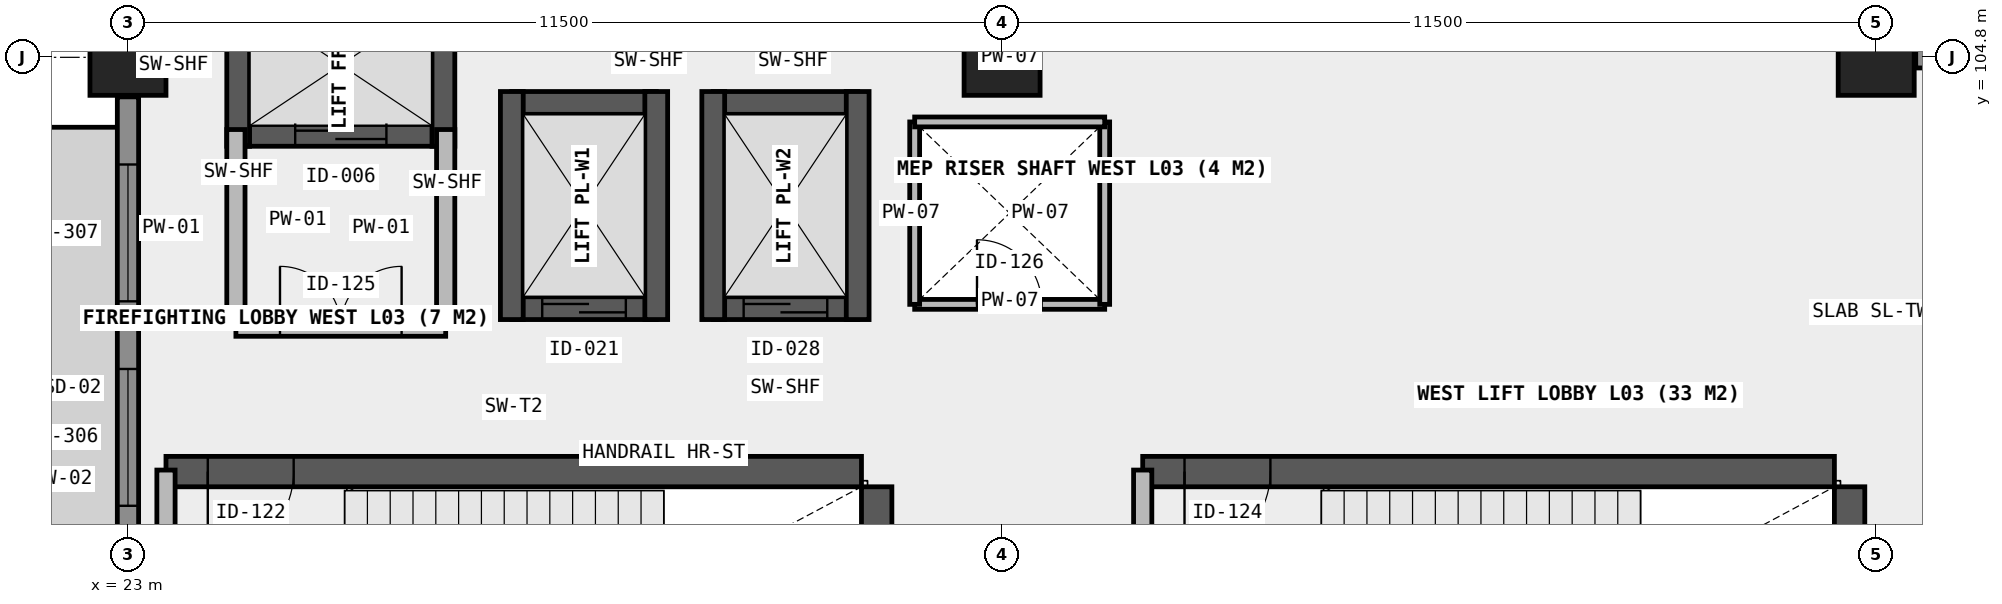
"""IFC4 building model, lengths in metres.
Left out: names, types, materials, properties, quantities, classifications, styles, units other than length and angle.
Written with IfcOpenShell. Run it as: python <this file> out.ifc"""

import sys

from ifc_helpers import new_model, si_unit, direction, frame, frame_2d, origin, origin_2d, place, context, subcontext, project, spatial, rectangle, extrude, element, fill, save


model = new_model("IFC4")
c1 = context("Model", 3, precision=1e-05, world=origin(), true_north=direction((0.0, 1.0)))
c2 = subcontext(c1, "Body", "Model", "MODEL_VIEW")
j1 = project(units=[si_unit("LENGTHUNIT", "METRE"), si_unit("PLANEANGLEUNIT", "RADIAN")], contexts=[c1])
p1 = place(None, origin())
s1 = spatial("IfcSite", under=j1, at=p1, CompositionType="ELEMENT")
p2 = place(p1, origin())
s2 = spatial("IfcBuilding", under=s1, at=p2, CompositionType="ELEMENT")
p3 = place(p2, frame((0.0, 0.0, 13.8)))
s3 = spatial("IfcBuildingStorey", under=s2, at=p3, CompositionType="ELEMENT", Elevation=13.8)
for number, where, z_axis, x_axis in (
    (1, (23.0, 104.8, 0.0), (0.0, 0.0, 1.0), (1.0, 0.0, 0.0)),
    (2, (34.5, 104.8, 0.0), (0.0, 0.0, 1.0), (1.0, 0.0, 0.0)),
    (3, (46.0, 104.8, 0.0), (0.0, 0.0, 1.0), (1.0, 0.0, 0.0)),
):
    element("IfcColumn", number, at=place(p3, frame(where, z_axis=z_axis, x_axis=x_axis)), inside=s3, PredefinedType="COLUMN", context=c2, shape_type="SweptSolid", body=[
        extrude(rectangle(XDim=1.0, YDim=1.0, at=origin_2d()), origin(), (0.0, 0.0, 1.0), 4.5),
    ])
p4 = place(p3, frame((24.45, 103.78, 0.0), z_axis=(0.0, 0.0, 1.0), x_axis=(1.0, 0.0, 0.0)))
e4 = element("IfcWall", 4, at=p4, inside=s3, PredefinedType="SHEAR", context=c2, shape_type="SweptSolid", body=[
    extrude(rectangle(XDim=2.7, YDim=0.3, at=frame_2d((1.35, 0.0))), origin(), (0.0, 0.0, 1.0), 4.5),
])
p5 = place(p4, frame((0.75, 0.0, 0.0)))
e5 = element("IfcOpeningElement", 5, at=p5, cuts=e4, PredefinedType="OPENING", context=c2, shape_type="SweptSolid", body=[
    extrude(rectangle(XDim=1.2, YDim=2.15, at=frame_2d((0.6, 1.075))), frame((0.0, 0.16, 0.0), z_axis=(0.0, -1.0, 0.0), x_axis=(1.0, 0.0, 0.0)), (0.0, 0.0, 1.0), 0.32),
])
for number, where, z_axis, x_axis in (
    (6, (24.45, 103.63, 0.0), (0.0, 0.0, 1.0), (0.0, 1.0, 0.0)),
    (7, (27.15, 103.63, 0.0), (0.0, 0.0, 1.0), (0.0, 1.0, 0.0)),
):
    element("IfcWall", number, at=place(p3, frame(where, z_axis=z_axis, x_axis=x_axis)), inside=s3, PredefinedType="SHEAR", context=c2, shape_type="SweptSolid", body=[
        extrude(rectangle(XDim=2.14, YDim=0.3, at=frame_2d((1.07, 0.0))), origin(), (0.0, 0.0, 1.0), 4.5),
    ])
p6 = place(p3, frame((28.05, 101.5, 0.0), z_axis=(0.0, 0.0, 1.0), x_axis=(1.0, 0.0, 0.0)))
e8 = element("IfcWall", 8, at=p6, inside=s3, PredefinedType="SHEAR", context=c2, shape_type="SweptSolid", body=[
    extrude(rectangle(XDim=1.9, YDim=0.3, at=frame_2d((0.95, 0.0))), origin(), (0.0, 0.0, 1.0), 4.5),
])
p7 = place(p6, frame((0.4, 0.0, 0.0)))
e9 = element("IfcOpeningElement", 9, at=p7, cuts=e8, PredefinedType="OPENING", context=c2, shape_type="SweptSolid", body=[
    extrude(rectangle(XDim=1.1, YDim=2.15, at=frame_2d((0.55, 1.075))), frame((0.0, 0.16, 0.0), z_axis=(0.0, -1.0, 0.0), x_axis=(1.0, 0.0, 0.0)), (0.0, 0.0, 1.0), 0.32),
])
p8 = place(p3, frame((28.05, 104.2, 0.0), z_axis=(0.0, 0.0, 1.0), x_axis=(1.0, 0.0, 0.0)))
e10 = element("IfcWall", 10, at=p8, inside=s3, PredefinedType="SHEAR", context=c2, shape_type="SweptSolid", body=[
    extrude(rectangle(XDim=1.9, YDim=0.3, at=frame_2d((0.95, 0.0))), origin(), (0.0, 0.0, 1.0), 4.5),
])
for number, where, z_axis, x_axis in (
    (11, (28.05, 101.35, 0.0), (0.0, 0.0, 1.0), (0.0, 1.0, 0.0)),
    (12, (29.95, 101.35, 0.0), (0.0, 0.0, 1.0), (0.0, 1.0, 0.0)),
):
    element("IfcWall", number, at=place(p3, frame(where, z_axis=z_axis, x_axis=x_axis)), inside=s3, PredefinedType="SHEAR", context=c2, shape_type="SweptSolid", body=[
        extrude(rectangle(XDim=3.0, YDim=0.3, at=frame_2d((1.5, 0.0))), origin(), (0.0, 0.0, 1.0), 4.5),
    ])
p9 = place(p3, frame((30.7, 101.5, 0.0), z_axis=(0.0, 0.0, 1.0), x_axis=(1.0, 0.0, 0.0)))
e13 = element("IfcWall", 13, at=p9, inside=s3, PredefinedType="SHEAR", context=c2, shape_type="SweptSolid", body=[
    extrude(rectangle(XDim=1.9, YDim=0.3, at=frame_2d((0.95, 0.0))), origin(), (0.0, 0.0, 1.0), 4.5),
])
p10 = place(p9, frame((0.4, 0.0, 0.0)))
e14 = element("IfcOpeningElement", 14, at=p10, cuts=e13, PredefinedType="OPENING", context=c2, shape_type="SweptSolid", body=[
    extrude(rectangle(XDim=1.1, YDim=2.15, at=frame_2d((0.55, 1.075))), frame((0.0, 0.16, 0.0), z_axis=(0.0, -1.0, 0.0), x_axis=(1.0, 0.0, 0.0)), (0.0, 0.0, 1.0), 0.32),
])
p11 = place(p3, frame((30.7, 104.2, 0.0), z_axis=(0.0, 0.0, 1.0), x_axis=(1.0, 0.0, 0.0)))
e15 = element("IfcWall", 15, at=p11, inside=s3, PredefinedType="SHEAR", context=c2, shape_type="SweptSolid", body=[
    extrude(rectangle(XDim=1.9, YDim=0.3, at=frame_2d((0.95, 0.0))), origin(), (0.0, 0.0, 1.0), 4.5),
])
for number, where, z_axis, x_axis in (
    (16, (30.7, 101.35, 0.0), (0.0, 0.0, 1.0), (0.0, 1.0, 0.0)),
    (17, (32.6, 101.35, 0.0), (0.0, 0.0, 1.0), (0.0, 1.0, 0.0)),
):
    element("IfcWall", number, at=place(p3, frame(where, z_axis=z_axis, x_axis=x_axis)), inside=s3, PredefinedType="SHEAR", context=c2, shape_type="SweptSolid", body=[
        extrude(rectangle(XDim=3.0, YDim=0.3, at=frame_2d((1.5, 0.0))), origin(), (0.0, 0.0, 1.0), 4.5),
    ])
p12 = place(p3, frame((23.5, 99.35, 0.0), z_axis=(0.0, 0.0, 1.0), x_axis=(1.0, 0.0, 0.0)))
e18 = element("IfcWall", 18, at=p12, inside=s3, PredefinedType="SHEAR", context=c2, shape_type="SweptSolid", body=[
    extrude(rectangle(XDim=9.15, YDim=0.4, at=frame_2d((4.575, 0.0))), origin(), (0.0, 0.0, 1.0), 4.5),
])
p13 = place(p12, frame((0.55, 0.0, 0.0)))
e19 = element("IfcOpeningElement", 19, at=p13, cuts=e18, PredefinedType="OPENING", context=c2, shape_type="SweptSolid", body=[
    extrude(rectangle(XDim=1.13, YDim=2.15, at=frame_2d((0.565, 1.075))), frame((0.0, 0.21, 0.0), z_axis=(0.0, -1.0, 0.0), x_axis=(1.0, 0.0, 0.0)), (0.0, 0.0, 1.0), 0.42),
])
p14 = place(p3, frame((32.85, 95.55, 0.0), z_axis=(0.0, 0.0, 1.0), x_axis=(0.0, 1.0, 0.0)))
e20 = element("IfcWall", 20, at=p14, inside=s3, PredefinedType="SHEAR", context=c2, shape_type="SweptSolid", body=[
    extrude(rectangle(XDim=3.6, YDim=0.4, at=frame_2d((1.8, 0.0))), origin(), (0.0, 0.0, 1.0), 4.5),
])
p15 = place(p3, frame((36.35, 99.35, 0.0), z_axis=(0.0, 0.0, 1.0), x_axis=(1.0, 0.0, 0.0)))
e21 = element("IfcWall", 21, at=p15, inside=s3, PredefinedType="SHEAR", context=c2, shape_type="SweptSolid", body=[
    extrude(rectangle(XDim=9.1, YDim=0.4, at=frame_2d((4.55, 0.0))), origin(), (0.0, 0.0, 1.0), 4.5),
])
p16 = place(p15, frame((0.55, 0.0, 0.0)))
e22 = element("IfcOpeningElement", 22, at=p16, cuts=e21, PredefinedType="OPENING", context=c2, shape_type="SweptSolid", body=[
    extrude(rectangle(XDim=1.13, YDim=2.15, at=frame_2d((0.565, 1.075))), frame((0.0, 0.21, 0.0), z_axis=(0.0, -1.0, 0.0), x_axis=(1.0, 0.0, 0.0)), (0.0, 0.0, 1.0), 0.42),
])
p17 = place(p3, frame((45.65, 95.32, 0.0), z_axis=(0.0, 0.0, 1.0), x_axis=(0.0, 1.0, 0.0)))
e23 = element("IfcWall", 23, at=p17, inside=s3, PredefinedType="SHEAR", context=c2, shape_type="SweptSolid", body=[
    extrude(rectangle(XDim=3.83, YDim=0.4, at=frame_2d((1.915, 0.0))), origin(), (0.0, 0.0, 1.0), 4.5),
])
p18 = place(p3, frame((46.52, 104.8, 0.0), z_axis=(0.0, 0.0, 1.0), x_axis=(1.0, 0.0, 0.0)))
e24 = element("IfcWall", 24, at=p18, inside=s3, PredefinedType="SOLIDWALL", context=c2, shape_type="SweptSolid", body=[
    extrude(rectangle(XDim=10.46, YDim=0.28, at=frame_2d((5.23, 0.0))), origin(), (0.0, 0.0, 1.0), 3.45),
])
p19 = place(p18, frame((1.265, 0.0, 0.85)))
e25 = element("IfcOpeningElement", 25, at=p19, cuts=e24, PredefinedType="OPENING", context=c2, shape_type="SweptSolid", body=[
    extrude(rectangle(XDim=1.8, YDim=1.95, at=frame_2d((0.9, 0.975))), frame((0.0, 0.15, 0.0), z_axis=(0.0, -1.0, 0.0), x_axis=(1.0, 0.0, 0.0)), (0.0, 0.0, 1.0), 0.3),
])
p20 = place(p18, frame((4.33, 0.0, 0.85)))
e26 = element("IfcOpeningElement", 26, at=p20, cuts=e24, PredefinedType="OPENING", context=c2, shape_type="SweptSolid", body=[
    extrude(rectangle(XDim=1.8, YDim=1.95, at=frame_2d((0.9, 0.975))), frame((0.0, 0.15, 0.0), z_axis=(0.0, -1.0, 0.0), x_axis=(1.0, 0.0, 0.0)), (0.0, 0.0, 1.0), 0.3),
])
p21 = place(p18, frame((7.395, 0.0, 0.85)))
e27 = element("IfcOpeningElement", 27, at=p21, cuts=e24, PredefinedType="OPENING", context=c2, shape_type="SweptSolid", body=[
    extrude(rectangle(XDim=1.8, YDim=1.95, at=frame_2d((0.9, 0.975))), frame((0.0, 0.15, 0.0), z_axis=(0.0, -1.0, 0.0), x_axis=(1.0, 0.0, 0.0)), (0.0, 0.0, 1.0), 0.3),
])
p22 = place(p3, frame((23.0, 95.32, 0.0), z_axis=(0.0, 0.0, 1.0), x_axis=(0.0, 1.0, 0.0)))
e28 = element("IfcWall", 28, at=p22, inside=s3, PredefinedType="SOLIDWALL", context=c2, shape_type="SweptSolid", body=[
    extrude(rectangle(XDim=8.96, YDim=0.28, at=frame_2d((4.48, 0.0))), origin(), (0.0, 0.0, 1.0), 3.45),
])
p23 = place(p22, frame((0.89, 0.0, 0.85)))
e29 = element("IfcOpeningElement", 29, at=p23, cuts=e28, PredefinedType="OPENING", context=c2, shape_type="SweptSolid", body=[
    extrude(rectangle(XDim=1.8, YDim=1.95, at=frame_2d((0.9, 0.975))), frame((0.0, 0.15, 0.0), z_axis=(0.0, -1.0, 0.0), x_axis=(1.0, 0.0, 0.0)), (0.0, 0.0, 1.0), 0.3),
])
p24 = place(p22, frame((3.58, 0.0, 0.85)))
e30 = element("IfcOpeningElement", 30, at=p24, cuts=e28, PredefinedType="OPENING", context=c2, shape_type="SweptSolid", body=[
    extrude(rectangle(XDim=1.8, YDim=1.95, at=frame_2d((0.9, 0.975))), frame((0.0, 0.15, 0.0), z_axis=(0.0, -1.0, 0.0), x_axis=(1.0, 0.0, 0.0)), (0.0, 0.0, 1.0), 0.3),
])
p25 = place(p22, frame((6.27, 0.0, 0.85)))
e31 = element("IfcOpeningElement", 31, at=p25, cuts=e28, PredefinedType="OPENING", context=c2, shape_type="SweptSolid", body=[
    extrude(rectangle(XDim=1.8, YDim=1.95, at=frame_2d((0.9, 0.975))), frame((0.0, 0.15, 0.0), z_axis=(0.0, -1.0, 0.0), x_axis=(1.0, 0.0, 0.0)), (0.0, 0.0, 1.0), 0.3),
])
p26 = place(p3, frame((23.5, 95.33, 0.0), z_axis=(0.0, 0.0, 1.0), x_axis=(0.0, 1.0, 0.0)))
e32 = element("IfcWall", 32, at=p26, inside=s3, PredefinedType="SOLIDWALL", context=c2, shape_type="SweptSolid", body=[
    extrude(rectangle(XDim=4.04, YDim=0.24, at=frame_2d((2.02, 0.0))), origin(), (0.0, 0.0, 1.0), 4.22),
])
p27 = place(p26, frame((1.45, 0.0, 0.0)))
e33 = element("IfcOpeningElement", 33, at=p27, cuts=e32, PredefinedType="OPENING", context=c2, shape_type="SweptSolid", body=[
    extrude(rectangle(XDim=1.13, YDim=2.15, at=frame_2d((0.565, 1.075))), frame((0.0, 0.13, 0.0), z_axis=(0.0, -1.0, 0.0), x_axis=(1.0, 0.0, 0.0)), (0.0, 0.0, 1.0), 0.26),
])
p28 = place(p3, frame((36.35, 95.33, 0.0), z_axis=(0.0, 0.0, 1.0), x_axis=(0.0, 1.0, 0.0)))
e34 = element("IfcWall", 34, at=p28, inside=s3, PredefinedType="SOLIDWALL", context=c2, shape_type="SweptSolid", body=[
    extrude(rectangle(XDim=4.04, YDim=0.24, at=frame_2d((2.02, 0.0))), origin(), (0.0, 0.0, 1.0), 4.22),
])
p29 = place(p28, frame((1.45, 0.0, 0.0)))
e35 = element("IfcOpeningElement", 35, at=p29, cuts=e34, PredefinedType="OPENING", context=c2, shape_type="SweptSolid", body=[
    extrude(rectangle(XDim=1.13, YDim=2.15, at=frame_2d((0.565, 1.075))), frame((0.0, 0.13, 0.0), z_axis=(0.0, -1.0, 0.0), x_axis=(1.0, 0.0, 0.0)), (0.0, 0.0, 1.0), 0.26),
])
p30 = place(p3, frame((24.42, 101.25, 0.0), z_axis=(0.0, 0.0, 1.0), x_axis=(1.0, 0.0, 0.0)))
e36 = element("IfcWall", 36, at=p30, inside=s3, PredefinedType="SOLIDWALL", context=c2, shape_type="SweptSolid", body=[
    extrude(rectangle(XDim=2.76, YDim=0.24, at=frame_2d((1.38, 0.0))), origin(), (0.0, 0.0, 1.0), 4.22),
])
p31 = place(p30, frame((0.58, 0.0, 0.0)))
e37 = element("IfcOpeningElement", 37, at=p31, cuts=e36, PredefinedType="OPENING", context=c2, shape_type="SweptSolid", body=[
    extrude(rectangle(XDim=1.6, YDim=2.15, at=frame_2d((0.8, 1.075))), frame((0.0, 0.13, 0.0), z_axis=(0.0, -1.0, 0.0), x_axis=(1.0, 0.0, 0.0)), (0.0, 0.0, 1.0), 0.26),
])
for number, where, z_axis, x_axis in (
    (38, (24.42, 101.25, 0.0), (0.0, 0.0, 1.0), (0.0, 1.0, 0.0)),
    (39, (27.18, 101.25, 0.0), (0.0, 0.0, 1.0), (0.0, 1.0, 0.0)),
):
    element("IfcWall", number, at=place(p3, frame(where, z_axis=z_axis, x_axis=x_axis)), inside=s3, PredefinedType="SOLIDWALL", context=c2, shape_type="SweptSolid", body=[
        extrude(rectangle(XDim=2.6, YDim=0.24, at=frame_2d((1.3, 0.0))), origin(), (0.0, 0.0, 1.0), 4.22),
    ])
p32 = place(p3, frame((33.35, 101.55, 0.0), z_axis=(0.0, 0.0, 1.0), x_axis=(1.0, 0.0, 0.0)))
e40 = element("IfcWall", 40, at=p32, inside=s3, PredefinedType="PLUMBINGWALL", context=c2, shape_type="SweptSolid", body=[
    extrude(rectangle(XDim=2.5, YDim=0.13, at=frame_2d((1.25, 0.0))), origin(), (0.0, 0.0, 1.0), 4.22),
])
p33 = place(p32, frame((0.82, 0.0, 0.0)))
e41 = element("IfcOpeningElement", 41, at=p33, cuts=e40, PredefinedType="OPENING", context=c2, shape_type="SweptSolid", body=[
    extrude(rectangle(XDim=0.85, YDim=2.0, at=frame_2d((0.425, 1.0))), frame((0.0, 0.075, 0.0), z_axis=(0.0, -1.0, 0.0), x_axis=(1.0, 0.0, 0.0)), (0.0, 0.0, 1.0), 0.15),
])
for number, where, z_axis, x_axis in (
    (42, (33.35, 101.55, 0.0), (0.0, 0.0, 1.0), (0.0, 1.0, 0.0)),
    (43, (35.85, 101.55, 0.0), (0.0, 0.0, 1.0), (0.0, 1.0, 0.0)),
):
    element("IfcWall", number, at=place(p3, frame(where, z_axis=z_axis, x_axis=x_axis)), inside=s3, PredefinedType="PLUMBINGWALL", context=c2, shape_type="SweptSolid", body=[
        extrude(rectangle(XDim=2.4, YDim=0.13, at=frame_2d((1.2, 0.0))), origin(), (0.0, 0.0, 1.0), 4.22),
    ])
p34 = place(p3, frame((33.35, 103.95, 0.0), z_axis=(0.0, 0.0, 1.0), x_axis=(1.0, 0.0, 0.0)))
e44 = element("IfcWall", 44, at=p34, inside=s3, PredefinedType="PLUMBINGWALL", context=c2, shape_type="SweptSolid", body=[
    extrude(rectangle(XDim=2.5, YDim=0.13, at=frame_2d((1.25, 0.0))), origin(), (0.0, 0.0, 1.0), 4.22),
])
p35 = place(p24, origin())
e45 = element("IfcWindow", 45, at=p35, inside=s3, PartitioningType="SINGLE_PANEL", PredefinedType="WINDOW", context=c2, shape_type="SweptSolid", body=[
    extrude(rectangle(XDim=1.8, YDim=1.95, at=frame_2d((0.9, 0.975))), frame((0.0, 0.03, 0.0), z_axis=(0.0, -1.0, 0.0), x_axis=(1.0, 0.0, 0.0)), (0.0, 0.0, 1.0), 0.06),
])
fill(e30, e45)
p36 = place(p25, origin())
e46 = element("IfcWindow", 46, at=p36, inside=s3, PartitioningType="SINGLE_PANEL", PredefinedType="WINDOW", context=c2, shape_type="SweptSolid", body=[
    extrude(rectangle(XDim=1.8, YDim=1.95, at=frame_2d((0.9, 0.975))), frame((0.0, 0.03, 0.0), z_axis=(0.0, -1.0, 0.0), x_axis=(1.0, 0.0, 0.0)), (0.0, 0.0, 1.0), 0.06),
])
fill(e31, e46)
p37 = place(p5, origin())
e47 = element("IfcDoor", 47, at=p37, inside=s3, OperationType="SLIDING_TO_RIGHT", PredefinedType="DOOR", context=c2, shape_type="SweptSolid", body=[
    extrude(rectangle(XDim=1.2, YDim=2.15, at=frame_2d((0.6, 1.075))), frame((0.0, 0.025, 0.0), z_axis=(0.0, -1.0, 0.0), x_axis=(1.0, 0.0, 0.0)), (0.0, 0.0, 1.0), 0.05),
])
fill(e5, e47)
p38 = place(p7, origin())
e48 = element("IfcDoor", 48, at=p38, inside=s3, OperationType="SLIDING_TO_LEFT", PredefinedType="DOOR", context=c2, shape_type="SweptSolid", body=[
    extrude(rectangle(XDim=1.1, YDim=2.15, at=frame_2d((0.55, 1.075))), frame((0.0, 0.025, 0.0), z_axis=(0.0, -1.0, 0.0), x_axis=(1.0, 0.0, 0.0)), (0.0, 0.0, 1.0), 0.05),
])
fill(e9, e48)
p39 = place(p10, origin())
e49 = element("IfcDoor", 49, at=p39, inside=s3, OperationType="SLIDING_TO_LEFT", PredefinedType="DOOR", context=c2, shape_type="SweptSolid", body=[
    extrude(rectangle(XDim=1.1, YDim=2.15, at=frame_2d((0.55, 1.075))), frame((0.0, 0.025, 0.0), z_axis=(0.0, -1.0, 0.0), x_axis=(1.0, 0.0, 0.0)), (0.0, 0.0, 1.0), 0.05),
])
fill(e14, e49)
p40 = place(p13, frame((0.565, 0.0, 0.0), z_axis=(0.0, 0.0, 1.0), x_axis=(-1.0, 0.0, 0.0)))
e50 = element("IfcDoor", 50, at=p40, inside=s3, OperationType="SINGLE_SWING_LEFT", PredefinedType="DOOR", context=c2, shape_type="SweptSolid", body=[
    extrude(rectangle(XDim=1.13, YDim=2.15, at=frame_2d((0.0, 1.075))), frame((0.0, 0.025, 0.0), z_axis=(0.0, -1.0, 0.0), x_axis=(1.0, 0.0, 0.0)), (0.0, 0.0, 1.0), 0.05),
])
fill(e19, e50)
p41 = place(p16, frame((0.565, 0.0, 0.0), z_axis=(0.0, 0.0, 1.0), x_axis=(-1.0, 0.0, 0.0)))
e51 = element("IfcDoor", 51, at=p41, inside=s3, OperationType="SINGLE_SWING_LEFT", PredefinedType="DOOR", context=c2, shape_type="SweptSolid", body=[
    extrude(rectangle(XDim=1.13, YDim=2.15, at=frame_2d((0.0, 1.075))), frame((0.0, 0.025, 0.0), z_axis=(0.0, -1.0, 0.0), x_axis=(1.0, 0.0, 0.0)), (0.0, 0.0, 1.0), 0.05),
])
fill(e22, e51)
p42 = place(p31, origin())
e52 = element("IfcDoor", 52, at=p42, inside=s3, OperationType="DOUBLE_DOOR_SINGLE_SWING", PredefinedType="DOOR", context=c2, shape_type="SweptSolid", body=[
    extrude(rectangle(XDim=1.6, YDim=2.15, at=frame_2d((0.8, 1.075))), frame((0.0, 0.025, 0.0), z_axis=(0.0, -1.0, 0.0), x_axis=(1.0, 0.0, 0.0)), (0.0, 0.0, 1.0), 0.05),
])
fill(e37, e52)
p43 = place(p33, origin())
e53 = element("IfcDoor", 53, at=p43, inside=s3, OperationType="SINGLE_SWING_LEFT", PredefinedType="TRAPDOOR", context=c2, shape_type="SweptSolid", body=[
    extrude(rectangle(XDim=0.85, YDim=2.0, at=frame_2d((0.425, 1.0))), frame((0.0, 0.025, 0.0), z_axis=(0.0, -1.0, 0.0), x_axis=(1.0, 0.0, 0.0)), (0.0, 0.0, 1.0), 0.05),
])
fill(e41, e53)
save(model, sys.argv[1])
